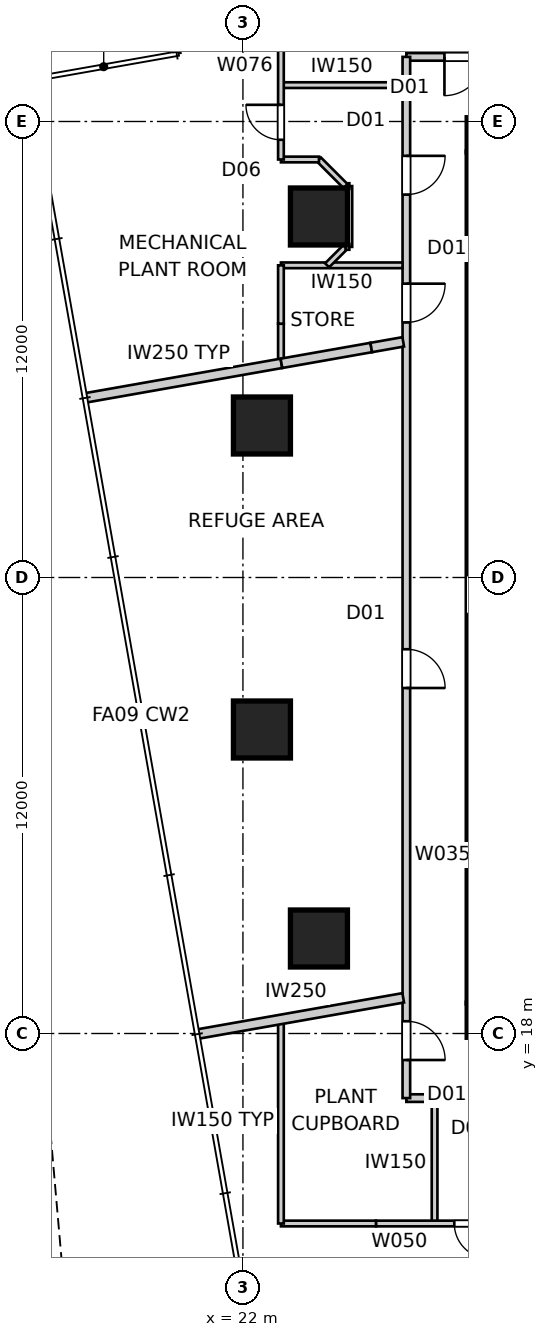
"""IFC4 building model, lengths in metres.
Left out: names, types, materials, properties, quantities, classifications, styles, units other than length and angle.
Written with IfcOpenShell. Run it as: python <this file> out.ifc"""

import sys

from ifc_helpers import new_model, si_unit, direction, frame, frame_2d, origin, origin_2d, place, context, subcontext, project, spatial, polyline, rectangle, outline, extrude, element, fill, save


model = new_model("IFC4")
c1 = context("Model", 3, precision=1e-05, world=origin(), true_north=direction((0.0, 1.0)))
c2 = subcontext(c1, "Body", "Model", "MODEL_VIEW")
j1 = project(units=[si_unit("LENGTHUNIT", "METRE"), si_unit("PLANEANGLEUNIT", "RADIAN")], contexts=[c1])
p1 = place(None, origin())
s1 = spatial("IfcSite", under=j1, at=p1, CompositionType="ELEMENT")
p2 = place(p1, origin())
s2 = spatial("IfcBuilding", under=s1, at=p2, CompositionType="ELEMENT")
p3 = place(p2, frame((0.0, 0.0, 74.4)))
s3 = spatial("IfcBuildingStorey", under=s2, at=p3, CompositionType="ELEMENT", Elevation=74.4)
p4 = place(p3, frame((28.35, 41.2, 0.0), z_axis=(0.0, 0.0, 1.0), x_axis=(0.0, -1.0, 0.0)))
e1 = element("IfcWall", 1, at=p4, inside=s3, PredefinedType="SHEAR", context=c2, shape_type="SweptSolid", body=[
    extrude(outline(polyline([(0.0, -0.45), (22.4, -0.45), (22.4, -0.025), (22.85, -0.025), (22.85, 0.025), (22.4, 0.025), (22.4, 0.45), (0.0, 0.45), (0.0, 0.025), (-0.45, 0.025), (-0.45, -0.025), (0.0, -0.025), (0.0, -0.45)])), origin(), (0.0, 0.0, 1.0), 5.0),
])
p5 = place(p4, frame((11.14, 0.0, 0.0)))
e2 = element("IfcOpeningElement", 2, at=p5, cuts=e1, PredefinedType="OPENING", context=c2, shape_type="SweptSolid", body=[
    extrude(rectangle(XDim=1.02, YDim=2.4, at=frame_2d((0.51, 1.2))), frame((0.0, 0.46, 0.0), z_axis=(0.0, -1.0, 0.0), x_axis=(1.0, 0.0, 0.0)), (0.0, 0.0, 1.0), 0.92),
])
for number, where, z_axis, x_axis in (
    (3, (28.35, 18.35, 0.0), (0.0, 0.0, 1.0), (1.0, 0.0, 0.0)),
    (4, (28.35, 41.65, 0.0), (0.0, 0.0, 1.0), (1.0, 0.0, 0.0)),
):
    element("IfcColumn", number, at=place(p3, frame(where, z_axis=z_axis, x_axis=x_axis)), inside=s3, PredefinedType="COLUMN", context=c2, shape_type="SweptSolid", body=[
        extrude(rectangle(XDim=0.9, YDim=0.9, at=origin_2d()), origin(), (0.0, 0.0, 1.0), 5.0),
    ])
for number, where, z_axis, x_axis in (
    (5, (24.0, 39.5, 0.0), (0.0, 0.0, 1.0), (1.0, 0.0, 0.0)),
    (6, (22.5, 34.0, 0.0), (0.0, 0.0, 1.0), (1.0, 0.0, 0.0)),
    (7, (22.5, 26.0, 0.0), (0.0, 0.0, 1.0), (1.0, 0.0, 0.0)),
    (8, (24.0, 20.5, 0.0), (0.0, 0.0, 1.0), (1.0, 0.0, 0.0)),
):
    element("IfcColumn", number, at=place(p3, frame(where, z_axis=z_axis, x_axis=x_axis)), inside=s3, PredefinedType="COLUMN", context=c2, shape_type="SweptSolid", body=[
        extrude(rectangle(XDim=1.5, YDim=1.5, at=origin_2d()), origin(), (0.0, 0.0, 1.0), 5.0),
    ])
p6 = place(p3, frame((26.3, 16.3, 0.0), z_axis=(0.0, 0.0, 1.0), x_axis=(1.0, 0.0, 0.0)))
e9 = element("IfcWall", 9, at=p6, inside=s3, PredefinedType="PARTITIONING", context=c2, shape_type="SweptSolid", body=[
    extrude(rectangle(XDim=27.4, YDim=0.2, at=frame_2d((13.7, 0.0))), origin(), (0.0, 0.0, 1.0), 4.85),
])
p7 = place(p6, frame((20.916, 0.0, 0.0)))
e10 = element("IfcOpeningElement", 10, at=p7, cuts=e9, PredefinedType="OPENING", context=c2, shape_type="SweptSolid", body=[
    extrude(rectangle(XDim=1.02, YDim=2.34, at=frame_2d((0.51, 1.17))), frame((0.0, 0.11, 0.0), z_axis=(0.0, -1.0, 0.0), x_axis=(1.0, 0.0, 0.0)), (0.0, 0.0, 1.0), 0.22),
])
p8 = place(p6, frame((9.684, 0.0, 0.0)))
e11 = element("IfcOpeningElement", 11, at=p8, cuts=e9, PredefinedType="OPENING", context=c2, shape_type="SweptSolid", body=[
    extrude(rectangle(XDim=1.02, YDim=2.34, at=frame_2d((0.51, 1.17))), frame((0.0, 0.11, 0.0), z_axis=(0.0, -1.0, 0.0), x_axis=(1.0, 0.0, 0.0)), (0.0, 0.0, 1.0), 0.22),
])
p9 = place(p6, frame((15.011, 0.0, 0.0)))
e12 = element("IfcOpeningElement", 12, at=p9, cuts=e9, PredefinedType="OPENING", context=c2, shape_type="SweptSolid", body=[
    extrude(rectangle(XDim=1.02, YDim=2.34, at=frame_2d((0.51, 1.17))), frame((0.0, 0.11, 0.0), z_axis=(0.0, -1.0, 0.0), x_axis=(1.0, 0.0, 0.0)), (0.0, 0.0, 1.0), 0.22),
])
p10 = place(p6, frame((2.604, 0.0, 0.0)))
e13 = element("IfcOpeningElement", 13, at=p10, cuts=e9, PredefinedType="OPENING", context=c2, shape_type="SweptSolid", body=[
    extrude(rectangle(XDim=1.02, YDim=2.34, at=frame_2d((0.51, 1.17))), frame((0.0, 0.11, 0.0), z_axis=(0.0, -1.0, 0.0), x_axis=(1.0, 0.0, 0.0)), (0.0, 0.0, 1.0), 0.22),
])
p11 = place(p6, frame((5.968, 0.0, 0.0)))
e14 = element("IfcOpeningElement", 14, at=p11, cuts=e9, PredefinedType="OPENING", context=c2, shape_type="SweptSolid", body=[
    extrude(rectangle(XDim=1.02, YDim=2.34, at=frame_2d((0.51, 1.17))), frame((0.0, 0.11, 0.0), z_axis=(0.0, -1.0, 0.0), x_axis=(1.0, 0.0, 0.0)), (0.0, 0.0, 1.0), 0.22),
])
p12 = place(p3, frame((53.7, 43.7, 0.0), z_axis=(0.0, 0.0, 1.0), x_axis=(-1.0, 0.0, 0.0)))
e15 = element("IfcWall", 15, at=p12, inside=s3, PredefinedType="PARTITIONING", context=c2, shape_type="SweptSolid", body=[
    extrude(rectangle(XDim=27.4, YDim=0.2, at=frame_2d((13.7, 0.0))), origin(), (0.0, 0.0, 1.0), 4.85),
])
p13 = place(p12, frame((12.031, 0.0, 0.0)))
e16 = element("IfcOpeningElement", 16, at=p13, cuts=e15, PredefinedType="OPENING", context=c2, shape_type="SweptSolid", body=[
    extrude(rectangle(XDim=1.02, YDim=2.34, at=frame_2d((0.51, 1.17))), frame((0.0, 0.11, 0.0), z_axis=(0.0, -1.0, 0.0), x_axis=(1.0, 0.0, 0.0)), (0.0, 0.0, 1.0), 0.22),
])
p14 = place(p12, frame((25.378, 0.0, 0.0)))
e17 = element("IfcOpeningElement", 17, at=p14, cuts=e15, PredefinedType="OPENING", context=c2, shape_type="SweptSolid", body=[
    extrude(rectangle(XDim=1.02, YDim=2.34, at=frame_2d((0.51, 1.17))), frame((0.0, 0.11, 0.0), z_axis=(0.0, -1.0, 0.0), x_axis=(1.0, 0.0, 0.0)), (0.0, 0.0, 1.0), 0.22),
])
p15 = place(p3, frame((26.3, 43.7, 0.0), z_axis=(0.0, 0.0, 1.0), x_axis=(0.0, -1.0, 0.0)))
e18 = element("IfcWall", 18, at=p15, inside=s3, PredefinedType="PARTITIONING", context=c2, shape_type="SweptSolid", body=[
    extrude(rectangle(XDim=27.4, YDim=0.2, at=frame_2d((13.7, 0.0))), origin(), (0.0, 0.0, 1.0), 4.85),
])
p16 = place(p15, frame((15.588, 0.0, 0.0)))
e19 = element("IfcOpeningElement", 19, at=p16, cuts=e18, PredefinedType="OPENING", context=c2, shape_type="SweptSolid", body=[
    extrude(rectangle(XDim=1.02, YDim=2.34, at=frame_2d((0.51, 1.17))), frame((0.0, 0.11, 0.0), z_axis=(0.0, -1.0, 0.0), x_axis=(1.0, 0.0, 0.0)), (0.0, 0.0, 1.0), 0.22),
])
p17 = place(p15, frame((2.604, 0.0, 0.0)))
e20 = element("IfcOpeningElement", 20, at=p17, cuts=e18, PredefinedType="OPENING", context=c2, shape_type="SweptSolid", body=[
    extrude(rectangle(XDim=1.02, YDim=2.34, at=frame_2d((0.51, 1.17))), frame((0.0, 0.11, 0.0), z_axis=(0.0, -1.0, 0.0), x_axis=(1.0, 0.0, 0.0)), (0.0, 0.0, 1.0), 0.22),
])
p18 = place(p15, frame((25.378, 0.0, 0.0)))
e21 = element("IfcOpeningElement", 21, at=p18, cuts=e18, PredefinedType="OPENING", context=c2, shape_type="SweptSolid", body=[
    extrude(rectangle(XDim=1.02, YDim=2.34, at=frame_2d((0.51, 1.17))), frame((0.0, 0.11, 0.0), z_axis=(0.0, -1.0, 0.0), x_axis=(1.0, 0.0, 0.0)), (0.0, 0.0, 1.0), 0.22),
])
p19 = place(p15, frame((5.968, 0.0, 0.0)))
e22 = element("IfcOpeningElement", 22, at=p19, cuts=e18, PredefinedType="OPENING", context=c2, shape_type="SweptSolid", body=[
    extrude(rectangle(XDim=1.02, YDim=2.34, at=frame_2d((0.51, 1.17))), frame((0.0, 0.11, 0.0), z_axis=(0.0, -1.0, 0.0), x_axis=(1.0, 0.0, 0.0)), (0.0, 0.0, 1.0), 0.22),
])
p20 = place(p3, frame((27.982, 49.205, 0.0), z_axis=(0.0, 0.0, 1.0), x_axis=(0.173674040102, -0.984803192417, 0.0)))
e23 = element("IfcWall", 23, at=p20, inside=s3, PredefinedType="PARTITIONING", context=c2, shape_type="SweptSolid", body=[
    extrude(rectangle(XDim=5.506, YDim=0.25, at=frame_2d((2.753, 0.0))), origin(), (0.0, 0.0, 1.0), 4.85),
])
p21 = place(p3, frame((17.843, 34.724, 0.0), z_axis=(0.0, 0.0, 1.0), x_axis=(0.984813509266, 0.173615529166, 0.0)))
e24 = element("IfcWall", 24, at=p21, inside=s3, PredefinedType="PARTITIONING", context=c2, shape_type="SweptSolid", body=[
    extrude(rectangle(XDim=5.25, YDim=0.25, at=frame_2d((2.625, 0.0))), origin(), (0.0, 0.0, 1.0), 4.85),
])
p22 = place(p3, frame((23.013, 35.636, 0.0), z_axis=(0.0, 0.0, 1.0), x_axis=(0.984811193906, 0.17362866226, 0.0)))
e25 = element("IfcWall", 25, at=p22, inside=s3, PredefinedType="PARTITIONING", context=c2, shape_type="SweptSolid", body=[
    extrude(rectangle(XDim=2.4, YDim=0.25, at=frame_2d((1.2, 0.0))), origin(), (0.0, 0.0, 1.0), 4.322),
])
p23 = place(p3, frame((25.376, 36.052, 0.0), z_axis=(0.0, 0.0, 1.0), x_axis=(0.984789312188, 0.173752728326, 0.0)))
e26 = element("IfcWall", 26, at=p23, inside=s3, PredefinedType="PARTITIONING", context=c2, shape_type="SweptSolid", body=[
    extrude(rectangle(XDim=0.854, YDim=0.25, at=frame_2d((0.427, 0.0))), origin(), (0.0, 0.0, 1.0), 4.85),
])
p24 = place(p3, frame((20.795, 17.982, 0.0), z_axis=(0.0, 0.0, 1.0), x_axis=(0.984803192417, 0.173674040102, 0.0)))
e27 = element("IfcWall", 27, at=p24, inside=s3, PredefinedType="PARTITIONING", context=c2, shape_type="SweptSolid", body=[
    extrude(rectangle(XDim=5.506, YDim=0.25, at=frame_2d((2.753, 0.0))), origin(), (0.0, 0.0, 1.0), 4.85),
])
p25 = place(p3, frame((27.043, 13.0, 0.0), z_axis=(0.0, 0.0, 1.0), x_axis=(0.0, 1.0, 0.0)))
e28 = element("IfcWall", 28, at=p25, inside=s3, PredefinedType="SOLIDWALL", context=c2, shape_type="SweptSolid", body=[
    extrude(rectangle(XDim=3.2, YDim=0.15, at=frame_2d((1.6, 0.0))), origin(), (0.0, 0.0, 1.0), 4.85),
])
p26 = place(p3, frame((29.0, 13.0, 0.0), z_axis=(0.0, 0.0, 1.0), x_axis=(-1.0, 0.0, 0.0)))
e29 = element("IfcWall", 29, at=p26, inside=s3, PredefinedType="SOLIDWALL", context=c2, shape_type="SweptSolid", body=[
    extrude(rectangle(XDim=3.5, YDim=0.15, at=frame_2d((1.75, 0.0))), origin(), (0.0, 0.0, 1.0), 4.85),
])
p27 = place(p26, frame((0.519, 0.0, 0.0)))
e30 = element("IfcOpeningElement", 30, at=p27, cuts=e29, PredefinedType="OPENING", context=c2, shape_type="SweptSolid", body=[
    extrude(rectangle(XDim=0.92, YDim=2.1, at=frame_2d((0.46, 1.05))), frame((0.0, 0.085, 0.0), z_axis=(0.0, -1.0, 0.0), x_axis=(1.0, 0.0, 0.0)), (0.0, 0.0, 1.0), 0.17),
])
p28 = place(p3, frame((25.5, 13.0, 0.0), z_axis=(0.0, 0.0, 1.0), x_axis=(-1.0, 0.0, 0.0)))
e31 = element("IfcWall", 31, at=p28, inside=s3, PredefinedType="SOLIDWALL", context=c2, shape_type="SweptSolid", body=[
    extrude(rectangle(XDim=2.5, YDim=0.15, at=frame_2d((1.25, 0.0))), origin(), (0.0, 0.0, 1.0), 4.049),
])
p29 = place(p3, frame((23.0, 13.0, 0.0), z_axis=(0.0, 0.0, 1.0), x_axis=(0.0, 1.0, 0.0)))
e32 = element("IfcWall", 32, at=p29, inside=s3, PredefinedType="SOLIDWALL", context=c2, shape_type="SweptSolid", body=[
    extrude(rectangle(XDim=5.371, YDim=0.15, at=frame_2d((2.686, 0.0))), origin(), (0.0, 0.0, 1.0), 4.85),
])
for number, where, z_axis, x_axis in (
    (33, (23.0, 42.957, 0.0), (0.0, 0.0, 1.0), (1.0, 0.0, 0.0)),
    (34, (26.2, 38.215, 0.0), (0.0, 0.0, 1.0), (-1.0, 0.0, 0.0)),
):
    element("IfcWall", number, at=place(p3, frame(where, z_axis=z_axis, x_axis=x_axis)), inside=s3, PredefinedType="SOLIDWALL", context=c2, shape_type="SweptSolid", body=[
        extrude(rectangle(XDim=3.2, YDim=0.15, at=frame_2d((1.6, 0.0))), origin(), (0.0, 0.0, 1.0), 4.85),
    ])
p30 = place(p3, frame((24.215, 38.215, 0.0), z_axis=(0.0, 0.0, 1.0), x_axis=(0.707106781187, 0.707106781187, 0.0)))
e35 = element("IfcWall", 35, at=p30, inside=s3, PredefinedType="SOLIDWALL", context=c2, shape_type="SweptSolid", body=[
    extrude(rectangle(XDim=0.686, YDim=0.15, at=frame_2d((0.343, 0.0))), origin(), (0.0, 0.0, 1.0), 4.85),
])
p31 = place(p3, frame((24.8, 38.7, 0.0), z_axis=(0.0, 0.0, 1.0), x_axis=(0.0, 1.0, 0.0)))
e36 = element("IfcWall", 36, at=p31, inside=s3, PredefinedType="SOLIDWALL", context=c2, shape_type="SweptSolid", body=[
    extrude(rectangle(XDim=1.6, YDim=0.15, at=frame_2d((0.8, 0.0))), origin(), (0.0, 0.0, 1.0), 4.85),
])
p32 = place(p3, frame((24.7, 40.3, 0.0), z_axis=(0.0, 0.0, 1.0), x_axis=(-0.707106781187, 0.707106781187, 0.0)))
e37 = element("IfcWall", 37, at=p32, inside=s3, PredefinedType="SOLIDWALL", context=c2, shape_type="SweptSolid", body=[
    extrude(rectangle(XDim=0.99, YDim=0.15, at=frame_2d((0.495, 0.0))), origin(), (0.0, 0.0, 1.0), 4.85),
])
p33 = place(p3, frame((24.0, 41.0, 0.0), z_axis=(0.0, 0.0, 1.0), x_axis=(-1.0, 0.0, 0.0)))
e38 = element("IfcWall", 38, at=p33, inside=s3, PredefinedType="SOLIDWALL", context=c2, shape_type="SweptSolid", body=[
    extrude(rectangle(XDim=1.0, YDim=0.15, at=frame_2d((0.5, 0.0))), origin(), (0.0, 0.0, 1.0), 4.85),
])
p34 = place(p3, frame((23.0, 41.0, 0.0), z_axis=(0.0, 0.0, 1.0), x_axis=(0.0, 1.0, 0.0)))
e39 = element("IfcWall", 39, at=p34, inside=s3, PredefinedType="SOLIDWALL", context=c2, shape_type="SweptSolid", body=[
    extrude(rectangle(XDim=3.5, YDim=0.15, at=frame_2d((1.75, 0.0))), origin(), (0.0, 0.0, 1.0), 4.85),
])
p35 = place(p34, frame((0.519, 0.0, 0.0)))
e40 = element("IfcOpeningElement", 40, at=p35, cuts=e39, PredefinedType="OPENING", context=c2, shape_type="SweptSolid", body=[
    extrude(rectangle(XDim=0.92, YDim=2.1, at=frame_2d((0.46, 1.05))), frame((0.0, 0.085, 0.0), z_axis=(0.0, -1.0, 0.0), x_axis=(1.0, 0.0, 0.0)), (0.0, 0.0, 1.0), 0.17),
])
p36 = place(p3, frame((23.0, 35.634, 0.0), z_axis=(0.0, 0.0, 1.0), x_axis=(0.0, 1.0, 0.0)))
e41 = element("IfcWall", 41, at=p36, inside=s3, PredefinedType="SOLIDWALL", context=c2, shape_type="SweptSolid", body=[
    extrude(rectangle(XDim=1.045, YDim=0.15, at=frame_2d((0.522, 0.0))), origin(), (0.0, 0.0, 1.0), 3.85),
])
p37 = place(p3, frame((23.0, 36.678, 0.0), z_axis=(0.0, 0.0, 1.0), x_axis=(0.0, 1.0, 0.0)))
e42 = element("IfcWall", 42, at=p37, inside=s3, PredefinedType="SOLIDWALL", context=c2, shape_type="SweptSolid", body=[
    extrude(rectangle(XDim=1.537, YDim=0.15, at=frame_2d((0.768, 0.0))), origin(), (0.0, 0.0, 1.0), 4.85),
])
for number, where, z_axis, x_axis in (
    (43, (24.8, 38.7, 0.0), (0.0, 0.0, 1.0), (-1.0, 0.0, 0.0)),
    (44, (24.8, 40.3, 0.0), (0.0, 0.0, 1.0), (-1.0, 0.0, 0.0)),
):
    element("IfcWall", number, at=place(p3, frame(where, z_axis=z_axis, x_axis=x_axis)), inside=s3, PredefinedType="SOLIDWALL", context=c2, shape_type="SweptSolid", body=[
        extrude(rectangle(XDim=0.1, YDim=0.15, at=frame_2d((0.05, 0.0))), origin(), (0.0, 0.0, 1.0), 4.85),
    ])
p38 = place(p16, origin())
e45 = element("IfcDoor", 45, at=p38, inside=s3, OperationType="SINGLE_SWING_RIGHT", PredefinedType="DOOR", context=c2, shape_type="SweptSolid", body=[
    extrude(rectangle(XDim=1.02, YDim=2.34, at=frame_2d((0.51, 1.17))), frame((0.0, 0.025, 0.0), z_axis=(0.0, -1.0, 0.0), x_axis=(1.0, 0.0, 0.0)), (0.0, 0.0, 1.0), 0.05),
])
fill(e19, e45)
p39 = place(p17, origin())
e46 = element("IfcDoor", 46, at=p39, inside=s3, OperationType="SINGLE_SWING_LEFT", PredefinedType="DOOR", context=c2, shape_type="SweptSolid", body=[
    extrude(rectangle(XDim=1.02, YDim=2.34, at=frame_2d((0.51, 1.17))), frame((0.0, 0.025, 0.0), z_axis=(0.0, -1.0, 0.0), x_axis=(1.0, 0.0, 0.0)), (0.0, 0.0, 1.0), 0.05),
])
fill(e20, e46)
p40 = place(p14, origin())
e47 = element("IfcDoor", 47, at=p40, inside=s3, OperationType="SINGLE_SWING_RIGHT", PredefinedType="DOOR", context=c2, shape_type="SweptSolid", body=[
    extrude(rectangle(XDim=1.02, YDim=2.34, at=frame_2d((0.51, 1.17))), frame((0.0, 0.025, 0.0), z_axis=(0.0, -1.0, 0.0), x_axis=(1.0, 0.0, 0.0)), (0.0, 0.0, 1.0), 0.05),
])
fill(e17, e47)
p41 = place(p18, origin())
e48 = element("IfcDoor", 48, at=p41, inside=s3, OperationType="SINGLE_SWING_RIGHT", PredefinedType="DOOR", context=c2, shape_type="SweptSolid", body=[
    extrude(rectangle(XDim=1.02, YDim=2.34, at=frame_2d((0.51, 1.17))), frame((0.0, 0.025, 0.0), z_axis=(0.0, -1.0, 0.0), x_axis=(1.0, 0.0, 0.0)), (0.0, 0.0, 1.0), 0.05),
])
fill(e21, e48)
p42 = place(p19, origin())
e49 = element("IfcDoor", 49, at=p42, inside=s3, OperationType="SINGLE_SWING_LEFT", PredefinedType="DOOR", context=c2, shape_type="SweptSolid", body=[
    extrude(rectangle(XDim=1.02, YDim=2.34, at=frame_2d((0.51, 1.17))), frame((0.0, 0.025, 0.0), z_axis=(0.0, -1.0, 0.0), x_axis=(1.0, 0.0, 0.0)), (0.0, 0.0, 1.0), 0.05),
])
fill(e22, e49)
p43 = place(p27, origin())
e50 = element("IfcDoor", 50, at=p43, inside=s3, OperationType="SINGLE_SWING_LEFT", PredefinedType="DOOR", context=c2, shape_type="SweptSolid", body=[
    extrude(rectangle(XDim=0.92, YDim=2.1, at=frame_2d((0.46, 1.05))), frame((0.0, 0.025, 0.0), z_axis=(0.0, -1.0, 0.0), x_axis=(1.0, 0.0, 0.0)), (0.0, 0.0, 1.0), 0.05),
])
fill(e30, e50)
p44 = place(p35, origin())
e51 = element("IfcDoor", 51, at=p44, inside=s3, OperationType="SINGLE_SWING_RIGHT", PredefinedType="DOOR", context=c2, shape_type="SweptSolid", body=[
    extrude(rectangle(XDim=0.92, YDim=2.1, at=frame_2d((0.46, 1.05))), frame((0.0, 0.025, 0.0), z_axis=(0.0, -1.0, 0.0), x_axis=(1.0, 0.0, 0.0)), (0.0, 0.0, 1.0), 0.05),
])
fill(e40, e51)
save(model, sys.argv[1])
